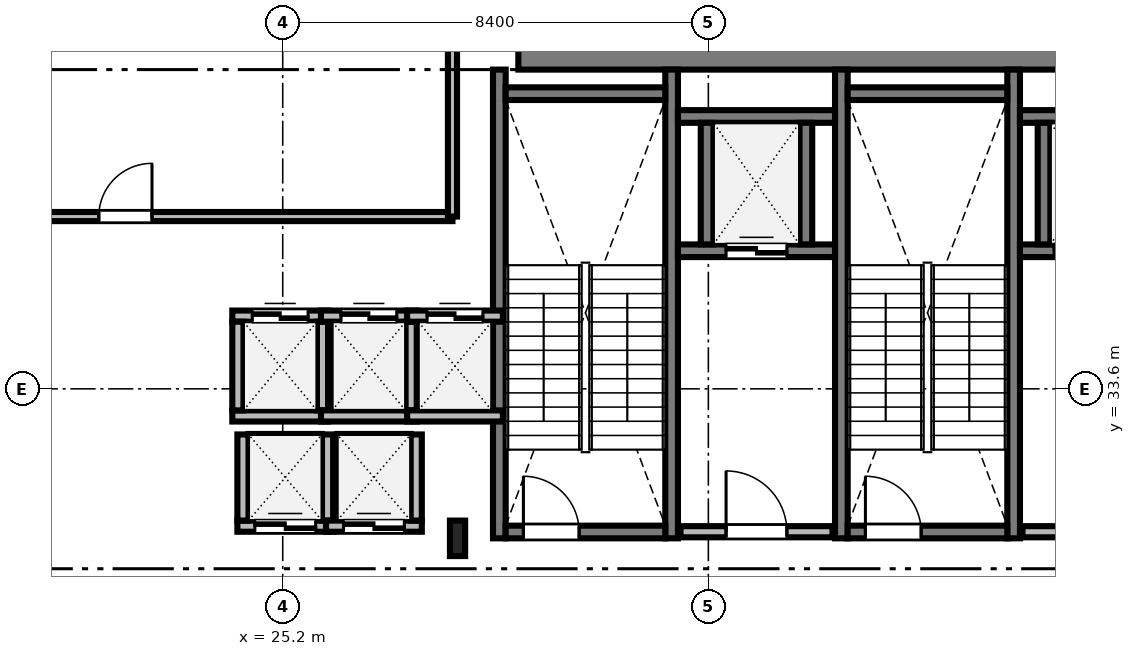
"""IFC4 building model, lengths in metres.
Left out: names, types, materials, properties, quantities, classifications, styles, units other than length and angle.
Written with IfcOpenShell. Run it as: python <this file> out.ifc"""

import sys

from ifc_helpers import new_model, si_unit, direction, frame, frame_2d, origin, origin_2d, place, context, subcontext, project, spatial, rectangle, i_section, extrude, source, transform, mapped, element, fill, save


model = new_model("IFC4")
c1 = context("Model", 3, precision=1e-05, world=origin(), true_north=direction((0.0, 1.0)))
c2 = subcontext(c1, "Body", "Model", "MODEL_VIEW")
j1 = project(units=[si_unit("LENGTHUNIT", "METRE"), si_unit("PLANEANGLEUNIT", "RADIAN")], contexts=[c1])
p1 = place(None, origin())
s1 = spatial("IfcSite", under=j1, at=p1, CompositionType="ELEMENT")
p2 = place(p1, origin())
s2 = spatial("IfcBuilding", under=s1, at=p2, CompositionType="ELEMENT")
p3 = place(p2, frame((0.0, 0.0, 172.2)))
s3 = spatial("IfcBuildingStorey", under=s2, at=p3, CompositionType="ELEMENT", Elevation=172.2)
m1 = source(origin(), c2, "Body", "SweptSolid", [
    extrude(rectangle(XDim=17.52, YDim=0.8, at=frame_2d((8.76, 0.0))), origin(), (0.0, 0.0, 1.0), 4.78),
])
p4 = place(p3, frame((29.85, 40.3, 0.0), z_axis=(0.0, 0.0, 1.0), x_axis=(1.0, 0.0, 0.0)))
e1 = element("IfcWall", 1, at=p4, inside=s3, PredefinedType="SHEAR", context=c2, shape_type="MappedRepresentation", body=[
    mapped(m1, transform((0.0, 0.0, 0.0), scale=1.0)),
])
m2 = source(origin(), c2, "Body", "SweptSolid", [
    extrude(i_section(OverallWidth=0.3, OverallDepth=0.7, WebThickness=0.017, FlangeThickness=0.032, FilletRadius=0.027, at=origin_2d()), origin(), (0.0, 0.0, 1.0), 4.78),
])
p5 = place(p3, frame((28.65, 30.65, 0.0), z_axis=(0.0, 0.0, 1.0), x_axis=(1.0, 0.0, 0.0)))
e2 = element("IfcColumn", 2, at=p5, inside=s3, PredefinedType="COLUMN", context=c2, shape_type="MappedRepresentation", body=[
    mapped(m2, transform((0.0, 0.0, 0.0), scale=1.0)),
])
m3 = source(origin(), c2, "Body", "SweptSolid", [
    extrude(rectangle(XDim=9.25, YDim=0.25, at=frame_2d((4.625, 0.0))), origin(), (0.0, 0.0, 1.0), 4.8),
])
for number, where, z_axis, x_axis in (
    (3, (29.475, 30.65, 0.0), (0.0, 0.0, 1.0), (0.0, 1.0, 0.0)),
    (4, (32.875, 30.65, 0.0), (0.0, 0.0, 1.0), (0.0, 1.0, 0.0)),
):
    element("IfcWall", number, at=place(p3, frame(where, z_axis=z_axis, x_axis=x_axis)), inside=s3, PredefinedType="SOLIDWALL", context=c2, shape_type="MappedRepresentation", body=[
        mapped(m3, transform((0.0, 0.0, 0.0), scale=1.0)),
    ])
m4 = source(origin(), c2, "Body", "SweptSolid", [
    extrude(rectangle(XDim=3.15, YDim=0.25, at=frame_2d((1.575, 0.0))), origin(), (0.0, 0.0, 1.0), 4.8),
])
p6 = place(p3, frame((29.6, 39.425, 0.0), z_axis=(0.0, 0.0, 1.0), x_axis=(1.0, 0.0, 0.0)))
e5 = element("IfcWall", 5, at=p6, inside=s3, PredefinedType="SOLIDWALL", context=c2, shape_type="MappedRepresentation", body=[
    mapped(m4, transform((0.0, 0.0, 0.0), scale=1.0)),
])
p7 = place(p3, frame((29.6, 30.775, 0.0), z_axis=(0.0, 0.0, 1.0), x_axis=(1.0, 0.0, 0.0)))
e6 = element("IfcWall", 6, at=p7, inside=s3, PredefinedType="SOLIDWALL", context=c2, shape_type="MappedRepresentation", body=[
    mapped(m4, transform((0.0, 0.0, 0.0), scale=1.0)),
])
m5 = source(origin(), c2, "Body", "SweptSolid", [
    extrude(rectangle(XDim=1.1, YDim=2.2, at=frame_2d((0.55, 1.1))), frame((0.0, 0.135, 0.0), z_axis=(0.0, -1.0, 0.0), x_axis=(1.0, 0.0, 0.0)), (0.0, 0.0, 1.0), 0.27),
])
p8 = place(p7, frame((0.35, 0.0, 0.0)))
e7 = element("IfcOpeningElement", 7, at=p8, cuts=e6, PredefinedType="OPENING", context=c2, shape_type="MappedRepresentation", body=[
    mapped(m5, transform((0.0, 0.0, 0.0), scale=1.0)),
])
for number, where, z_axis, x_axis in (
    (8, (36.225, 30.65, 0.0), (0.0, 0.0, 1.0), (0.0, 1.0, 0.0)),
    (9, (39.625, 30.65, 0.0), (0.0, 0.0, 1.0), (0.0, 1.0, 0.0)),
):
    element("IfcWall", number, at=place(p3, frame(where, z_axis=z_axis, x_axis=x_axis)), inside=s3, PredefinedType="SOLIDWALL", context=c2, shape_type="MappedRepresentation", body=[
        mapped(m3, transform((0.0, 0.0, 0.0), scale=1.0)),
    ])
p9 = place(p3, frame((36.35, 39.425, 0.0), z_axis=(0.0, 0.0, 1.0), x_axis=(1.0, 0.0, 0.0)))
e10 = element("IfcWall", 10, at=p9, inside=s3, PredefinedType="SOLIDWALL", context=c2, shape_type="MappedRepresentation", body=[
    mapped(m4, transform((0.0, 0.0, 0.0), scale=1.0)),
])
p10 = place(p3, frame((36.35, 30.775, 0.0), z_axis=(0.0, 0.0, 1.0), x_axis=(1.0, 0.0, 0.0)))
e11 = element("IfcWall", 11, at=p10, inside=s3, PredefinedType="SOLIDWALL", context=c2, shape_type="MappedRepresentation", body=[
    mapped(m4, transform((0.0, 0.0, 0.0), scale=1.0)),
])
p11 = place(p10, frame((0.35, 0.0, 0.0)))
e12 = element("IfcOpeningElement", 12, at=p11, cuts=e11, PredefinedType="OPENING", context=c2, shape_type="MappedRepresentation", body=[
    mapped(m5, transform((0.0, 0.0, 0.0), scale=1.0)),
])
m6 = source(origin(), c2, "Body", "SweptSolid", [
    extrude(rectangle(XDim=3.0, YDim=0.22, at=frame_2d((1.5, 0.0))), origin(), (0.0, 0.0, 1.0), 4.78),
])
p12 = place(p3, frame((33.05, 30.78, 0.0), z_axis=(0.0, 0.0, 1.0), x_axis=(1.0, 0.0, 0.0)))
e13 = element("IfcWall", 13, at=p12, inside=s3, PredefinedType="SOLIDWALL", context=c2, shape_type="MappedRepresentation", body=[
    mapped(m6, transform((0.0, 0.0, 0.0), scale=1.0)),
])
m7 = source(origin(), c2, "Body", "SweptSolid", [
    extrude(rectangle(XDim=1.2, YDim=2.2, at=frame_2d((0.6, 1.1))), frame((0.0, 0.12, 0.0), z_axis=(0.0, -1.0, 0.0), x_axis=(1.0, 0.0, 0.0)), (0.0, 0.0, 1.0), 0.24),
])
p13 = place(p12, frame((0.9, 0.0, 0.0)))
e14 = element("IfcOpeningElement", 14, at=p13, cuts=e13, PredefinedType="OPENING", context=c2, shape_type="MappedRepresentation", body=[
    mapped(m7, transform((0.0, 0.0, 0.0), scale=1.0)),
])
m8 = source(origin(), c2, "Body", "SweptSolid", [
    extrude(rectangle(XDim=2.8, YDim=0.22, at=frame_2d((1.4, 0.0))), origin(), (0.0, 0.0, 1.0), 4.78),
])
p14 = place(p3, frame((39.8, 30.78, 0.0), z_axis=(0.0, 0.0, 1.0), x_axis=(1.0, 0.0, 0.0)))
e15 = element("IfcWall", 15, at=p14, inside=s3, PredefinedType="SOLIDWALL", context=c2, shape_type="MappedRepresentation", body=[
    mapped(m8, transform((0.0, 0.0, 0.0), scale=1.0)),
])
p15 = place(p14, frame((0.8, 0.0, 0.0)))
e16 = element("IfcOpeningElement", 16, at=p15, cuts=e15, PredefinedType="OPENING", context=c2, shape_type="MappedRepresentation", body=[
    mapped(m7, transform((0.0, 0.0, 0.0), scale=1.0)),
])
m9 = source(origin(), c2, "Body", "SweptSolid", [
    extrude(rectangle(XDim=1.89, YDim=0.22, at=frame_2d((0.945, 0.0))), origin(), (0.0, 0.0, 1.0), 4.78),
])
p16 = place(p3, frame((24.205, 33.065, 0.0), z_axis=(0.0, 0.0, 1.0), x_axis=(1.0, 0.0, 0.0)))
e17 = element("IfcWall", 17, at=p16, inside=s3, PredefinedType="SOLIDWALL", context=c2, shape_type="MappedRepresentation", body=[
    mapped(m9, transform((0.0, 0.0, 0.0), scale=1.0)),
])
p17 = place(p3, frame((24.205, 35.035, 0.0), z_axis=(0.0, 0.0, 1.0), x_axis=(1.0, 0.0, 0.0)))
e18 = element("IfcWall", 18, at=p17, inside=s3, PredefinedType="SOLIDWALL", context=c2, shape_type="MappedRepresentation", body=[
    mapped(m9, transform((0.0, 0.0, 0.0), scale=1.0)),
])
m10 = source(origin(), c2, "Body", "SweptSolid", [
    extrude(rectangle(XDim=1.1, YDim=2.2, at=frame_2d((0.55, 1.1))), frame((0.0, 0.12, 0.0), z_axis=(0.0, -1.0, 0.0), x_axis=(1.0, 0.0, 0.0)), (0.0, 0.0, 1.0), 0.24),
])
p18 = place(p17, frame((0.395, 0.0, 0.0)))
e19 = element("IfcOpeningElement", 19, at=p18, cuts=e18, PredefinedType="OPENING", context=c2, shape_type="MappedRepresentation", body=[
    mapped(m10, transform((0.0, 0.0, 0.0), scale=1.0)),
])
m11 = source(origin(), c2, "Body", "SweptSolid", [
    extrude(rectangle(XDim=1.75, YDim=0.22, at=frame_2d((0.875, 0.0))), origin(), (0.0, 0.0, 1.0), 4.78),
])
for number, where, z_axis, x_axis in (
    (20, (24.315, 33.175, 0.0), (0.0, 0.0, 1.0), (0.0, 1.0, 0.0)),
    (21, (25.985, 33.175, 0.0), (0.0, 0.0, 1.0), (0.0, 1.0, 0.0)),
):
    element("IfcWall", number, at=place(p3, frame(where, z_axis=z_axis, x_axis=x_axis)), inside=s3, PredefinedType="SOLIDWALL", context=c2, shape_type="MappedRepresentation", body=[
        mapped(m11, transform((0.0, 0.0, 0.0), scale=1.0)),
    ])
p19 = place(p3, frame((25.955, 33.065, 0.0), z_axis=(0.0, 0.0, 1.0), x_axis=(1.0, 0.0, 0.0)))
e22 = element("IfcWall", 22, at=p19, inside=s3, PredefinedType="SOLIDWALL", context=c2, shape_type="MappedRepresentation", body=[
    mapped(m9, transform((0.0, 0.0, 0.0), scale=1.0)),
])
p20 = place(p3, frame((25.955, 35.035, 0.0), z_axis=(0.0, 0.0, 1.0), x_axis=(1.0, 0.0, 0.0)))
e23 = element("IfcWall", 23, at=p20, inside=s3, PredefinedType="SOLIDWALL", context=c2, shape_type="MappedRepresentation", body=[
    mapped(m9, transform((0.0, 0.0, 0.0), scale=1.0)),
])
p21 = place(p20, frame((0.395, 0.0, 0.0)))
e24 = element("IfcOpeningElement", 24, at=p21, cuts=e23, PredefinedType="OPENING", context=c2, shape_type="MappedRepresentation", body=[
    mapped(m10, transform((0.0, 0.0, 0.0), scale=1.0)),
])
p22 = place(p3, frame((27.735, 33.175, 0.0), z_axis=(0.0, 0.0, 1.0), x_axis=(0.0, 1.0, 0.0)))
e25 = element("IfcWall", 25, at=p22, inside=s3, PredefinedType="SOLIDWALL", context=c2, shape_type="MappedRepresentation", body=[
    mapped(m11, transform((0.0, 0.0, 0.0), scale=1.0)),
])
p23 = place(p3, frame((27.655, 33.065, 0.0), z_axis=(0.0, 0.0, 1.0), x_axis=(1.0, 0.0, 0.0)))
e26 = element("IfcWall", 26, at=p23, inside=s3, PredefinedType="SOLIDWALL", context=c2, shape_type="MappedRepresentation", body=[
    mapped(m9, transform((0.0, 0.0, 0.0), scale=1.0)),
])
p24 = place(p3, frame((27.655, 35.035, 0.0), z_axis=(0.0, 0.0, 1.0), x_axis=(1.0, 0.0, 0.0)))
e27 = element("IfcWall", 27, at=p24, inside=s3, PredefinedType="SOLIDWALL", context=c2, shape_type="MappedRepresentation", body=[
    mapped(m9, transform((0.0, 0.0, 0.0), scale=1.0)),
])
p25 = place(p24, frame((0.395, 0.0, 0.0)))
e28 = element("IfcOpeningElement", 28, at=p25, cuts=e27, PredefinedType="OPENING", context=c2, shape_type="MappedRepresentation", body=[
    mapped(m10, transform((0.0, 0.0, 0.0), scale=1.0)),
])
m12 = source(origin(), c2, "Body", "SweptSolid", [
    extrude(rectangle(XDim=3.1, YDim=0.25, at=frame_2d((1.55, 0.0))), origin(), (0.0, 0.0, 1.0), 4.78),
])
p26 = place(p3, frame((33.0, 36.325, 0.0), z_axis=(0.0, 0.0, 1.0), x_axis=(1.0, 0.0, 0.0)))
e29 = element("IfcWall", 29, at=p26, inside=s3, PredefinedType="SOLIDWALL", context=c2, shape_type="MappedRepresentation", body=[
    mapped(m12, transform((0.0, 0.0, 0.0), scale=1.0)),
])
m13 = source(origin(), c2, "Body", "SweptSolid", [
    extrude(rectangle(XDim=1.2, YDim=2.25, at=frame_2d((0.6, 1.125))), frame((0.0, 0.135, 0.0), z_axis=(0.0, -1.0, 0.0), x_axis=(1.0, 0.0, 0.0)), (0.0, 0.0, 1.0), 0.27),
])
p27 = place(p26, frame((0.95, 0.0, 0.0)))
e30 = element("IfcOpeningElement", 30, at=p27, cuts=e29, PredefinedType="OPENING", context=c2, shape_type="MappedRepresentation", body=[
    mapped(m13, transform((0.0, 0.0, 0.0), scale=1.0)),
])
p28 = place(p3, frame((33.0, 38.975, 0.0), z_axis=(0.0, 0.0, 1.0), x_axis=(1.0, 0.0, 0.0)))
e31 = element("IfcWall", 31, at=p28, inside=s3, PredefinedType="SOLIDWALL", context=c2, shape_type="MappedRepresentation", body=[
    mapped(m12, transform((0.0, 0.0, 0.0), scale=1.0)),
])
m14 = source(origin(), c2, "Body", "SweptSolid", [
    extrude(rectangle(XDim=2.4, YDim=0.25, at=frame_2d((1.2, 0.0))), origin(), (0.0, 0.0, 1.0), 4.78),
])
for number, where, z_axis, x_axis in (
    (32, (33.575, 36.45, 0.0), (0.0, 0.0, 1.0), (0.0, 1.0, 0.0)),
    (33, (35.525, 36.45, 0.0), (0.0, 0.0, 1.0), (0.0, 1.0, 0.0)),
):
    element("IfcWall", number, at=place(p3, frame(where, z_axis=z_axis, x_axis=x_axis)), inside=s3, PredefinedType="SOLIDWALL", context=c2, shape_type="MappedRepresentation", body=[
        mapped(m14, transform((0.0, 0.0, 0.0), scale=1.0)),
    ])
m15 = source(origin(), c2, "Body", "SweptSolid", [
    extrude(rectangle(XDim=2.55, YDim=0.25, at=frame_2d((1.275, 0.0))), origin(), (0.0, 0.0, 1.0), 4.78),
])
p29 = place(p3, frame((39.75, 36.325, 0.0), z_axis=(0.0, 0.0, 1.0), x_axis=(1.0, 0.0, 0.0)))
e34 = element("IfcWall", 34, at=p29, inside=s3, PredefinedType="SOLIDWALL", context=c2, shape_type="MappedRepresentation", body=[
    mapped(m15, transform((0.0, 0.0, 0.0), scale=1.0)),
])
p30 = place(p29, frame((0.675, 0.0, 0.0)))
e35 = element("IfcOpeningElement", 35, at=p30, cuts=e34, PredefinedType="OPENING", context=c2, shape_type="MappedRepresentation", body=[
    mapped(m13, transform((0.0, 0.0, 0.0), scale=1.0)),
])
p31 = place(p3, frame((39.75, 38.975, 0.0), z_axis=(0.0, 0.0, 1.0), x_axis=(1.0, 0.0, 0.0)))
e36 = element("IfcWall", 36, at=p31, inside=s3, PredefinedType="SOLIDWALL", context=c2, shape_type="MappedRepresentation", body=[
    mapped(m15, transform((0.0, 0.0, 0.0), scale=1.0)),
])
p32 = place(p3, frame((40.225, 36.45, 0.0), z_axis=(0.0, 0.0, 1.0), x_axis=(0.0, 1.0, 0.0)))
e37 = element("IfcWall", 37, at=p32, inside=s3, PredefinedType="SOLIDWALL", context=c2, shape_type="MappedRepresentation", body=[
    mapped(m14, transform((0.0, 0.0, 0.0), scale=1.0)),
])
m16 = source(origin(), c2, "Body", "SweptSolid", [
    extrude(rectangle(XDim=1.89, YDim=0.22, at=frame_2d((0.945, 0.0))), origin(), (0.0, 0.0, 1.0), 4.78),
])
p33 = place(p3, frame((24.305, 30.89, 0.0), z_axis=(0.0, 0.0, 1.0), x_axis=(1.0, 0.0, 0.0)))
e38 = element("IfcWall", 38, at=p33, inside=s3, PredefinedType="SOLIDWALL", context=c2, shape_type="MappedRepresentation", body=[
    mapped(m16, transform((0.0, 0.0, 0.0), scale=1.0)),
])
m17 = source(origin(), c2, "Body", "SweptSolid", [
    extrude(rectangle(XDim=1.2, YDim=2.25, at=frame_2d((0.6, 1.125))), frame((0.0, 0.12, 0.0), z_axis=(0.0, -1.0, 0.0), x_axis=(1.0, 0.0, 0.0)), (0.0, 0.0, 1.0), 0.24),
])
p34 = place(p33, frame((0.345, 0.0, 0.0)))
e39 = element("IfcOpeningElement", 39, at=p34, cuts=e38, PredefinedType="OPENING", context=c2, shape_type="MappedRepresentation", body=[
    mapped(m17, transform((0.0, 0.0, 0.0), scale=1.0)),
])
m18 = source(origin(), c2, "Body", "SweptSolid", [
    extrude(rectangle(XDim=1.7, YDim=0.22, at=frame_2d((0.85, 0.0))), origin(), (0.0, 0.0, 1.0), 4.78),
])
for number, where, z_axis, x_axis in (
    (40, (24.415, 31.0, 0.0), (0.0, 0.0, 1.0), (0.0, 1.0, 0.0)),
    (41, (26.085, 31.0, 0.0), (0.0, 0.0, 1.0), (0.0, 1.0, 0.0)),
):
    element("IfcWall", number, at=place(p3, frame(where, z_axis=z_axis, x_axis=x_axis)), inside=s3, PredefinedType="SOLIDWALL", context=c2, shape_type="MappedRepresentation", body=[
        mapped(m18, transform((0.0, 0.0, 0.0), scale=1.0)),
    ])
p35 = place(p3, frame((26.055, 30.89, 0.0), z_axis=(0.0, 0.0, 1.0), x_axis=(1.0, 0.0, 0.0)))
e42 = element("IfcWall", 42, at=p35, inside=s3, PredefinedType="SOLIDWALL", context=c2, shape_type="MappedRepresentation", body=[
    mapped(m16, transform((0.0, 0.0, 0.0), scale=1.0)),
])
p36 = place(p35, frame((0.345, 0.0, 0.0)))
e43 = element("IfcOpeningElement", 43, at=p36, cuts=e42, PredefinedType="OPENING", context=c2, shape_type="MappedRepresentation", body=[
    mapped(m17, transform((0.0, 0.0, 0.0), scale=1.0)),
])
p37 = place(p3, frame((27.835, 31.0, 0.0), z_axis=(0.0, 0.0, 1.0), x_axis=(0.0, 1.0, 0.0)))
e44 = element("IfcWall", 44, at=p37, inside=s3, PredefinedType="SOLIDWALL", context=c2, shape_type="MappedRepresentation", body=[
    mapped(m18, transform((0.0, 0.0, 0.0), scale=1.0)),
])
m19 = source(origin(), c2, "Body", "SweptSolid", [
    extrude(rectangle(XDim=17.128, YDim=0.18, at=frame_2d((8.564, 0.0))), origin(), (0.0, 0.0, 1.0), 4.022),
])
p38 = place(p3, frame((11.422, 37.0, 0.0), z_axis=(0.0, 0.0, 1.0), x_axis=(1.0, 0.0, 0.0)))
e45 = element("IfcWall", 45, at=p38, inside=s3, PredefinedType="PARTITIONING", context=c2, shape_type="MappedRepresentation", body=[
    mapped(m19, transform((0.0, 0.0, 0.0), scale=1.0)),
])
m20 = source(origin(), c2, "Body", "SweptSolid", [
    extrude(rectangle(XDim=1.05, YDim=2.2, at=frame_2d((0.525, 1.1))), frame((0.0, 0.1, 0.0), z_axis=(0.0, -1.0, 0.0), x_axis=(1.0, 0.0, 0.0)), (0.0, 0.0, 1.0), 0.2),
])
p39 = place(p38, frame((10.148, 0.0, 0.0)))
e46 = element("IfcOpeningElement", 46, at=p39, cuts=e45, PredefinedType="OPENING", context=c2, shape_type="MappedRepresentation", body=[
    mapped(m20, transform((0.0, 0.0, 0.0), scale=1.0)),
])
m21 = source(origin(), c2, "Body", "SweptSolid", [
    extrude(rectangle(XDim=11.278, YDim=0.18, at=frame_2d((5.639, 0.0))), origin(), (0.0, 0.0, 1.0), 4.022),
])
p40 = place(p3, frame((28.55, 37.0, 0.0), z_axis=(0.0, 0.0, 1.0), x_axis=(0.0, 1.0, 0.0)))
e47 = element("IfcWall", 47, at=p40, inside=s3, PredefinedType="PARTITIONING", context=c2, shape_type="MappedRepresentation", body=[
    mapped(m21, transform((0.0, 0.0, 0.0), scale=1.0)),
])
m22 = source(origin(), c2, "Body", "SweptSolid", [
    extrude(rectangle(XDim=1.1, YDim=2.2, at=frame_2d((0.55, 1.1))), frame((0.0, 0.025, 0.0), z_axis=(0.0, -1.0, 0.0), x_axis=(1.0, 0.0, 0.0)), (0.0, 0.0, 1.0), 0.05),
])
p41 = place(p8, origin())
e48 = element("IfcDoor", 48, at=p41, inside=s3, OperationType="SINGLE_SWING_LEFT", PredefinedType="DOOR", context=c2, shape_type="MappedRepresentation", body=[
    mapped(m22, transform((0.0, 0.0, 0.0), scale=1.0)),
])
fill(e7, e48)
p42 = place(p11, origin())
e49 = element("IfcDoor", 49, at=p42, inside=s3, OperationType="SINGLE_SWING_LEFT", PredefinedType="DOOR", context=c2, shape_type="MappedRepresentation", body=[
    mapped(m22, transform((0.0, 0.0, 0.0), scale=1.0)),
])
fill(e12, e49)
m23 = source(origin(), c2, "Body", "SweptSolid", [
    extrude(rectangle(XDim=1.2, YDim=2.2, at=frame_2d((0.6, 1.1))), frame((0.0, 0.025, 0.0), z_axis=(0.0, -1.0, 0.0), x_axis=(1.0, 0.0, 0.0)), (0.0, 0.0, 1.0), 0.05),
])
p43 = place(p13, origin())
e50 = element("IfcDoor", 50, at=p43, inside=s3, OperationType="SINGLE_SWING_LEFT", PredefinedType="DOOR", context=c2, shape_type="MappedRepresentation", body=[
    mapped(m23, transform((0.0, 0.0, 0.0), scale=1.0)),
])
fill(e14, e50)
p44 = place(p18, origin())
e51 = element("IfcDoor", 51, at=p44, inside=s3, OperationType="DOUBLE_DOOR_SLIDING", PredefinedType="DOOR", context=c2, shape_type="MappedRepresentation", body=[
    mapped(m22, transform((0.0, 0.0, 0.0), scale=1.0)),
])
fill(e19, e51)
p45 = place(p21, origin())
e52 = element("IfcDoor", 52, at=p45, inside=s3, OperationType="DOUBLE_DOOR_SLIDING", PredefinedType="DOOR", context=c2, shape_type="MappedRepresentation", body=[
    mapped(m22, transform((0.0, 0.0, 0.0), scale=1.0)),
])
fill(e24, e52)
p46 = place(p25, origin())
e53 = element("IfcDoor", 53, at=p46, inside=s3, OperationType="DOUBLE_DOOR_SLIDING", PredefinedType="DOOR", context=c2, shape_type="MappedRepresentation", body=[
    mapped(m22, transform((0.0, 0.0, 0.0), scale=1.0)),
])
fill(e28, e53)
m24 = source(origin(), c2, "Body", "SweptSolid", [
    extrude(rectangle(XDim=1.2, YDim=2.25, at=frame_2d((0.6, 1.125))), frame((0.0, 0.025, 0.0), z_axis=(0.0, -1.0, 0.0), x_axis=(1.0, 0.0, 0.0)), (0.0, 0.0, 1.0), 0.05),
])
p47 = place(p27, origin())
e54 = element("IfcDoor", 54, at=p47, inside=s3, OperationType="DOUBLE_DOOR_SLIDING", PredefinedType="DOOR", context=c2, shape_type="MappedRepresentation", body=[
    mapped(m24, transform((0.0, 0.0, 0.0), scale=1.0)),
])
fill(e30, e54)
p48 = place(p30, origin())
e55 = element("IfcDoor", 55, at=p48, inside=s3, OperationType="DOUBLE_DOOR_SLIDING", PredefinedType="DOOR", context=c2, shape_type="MappedRepresentation", body=[
    mapped(m24, transform((0.0, 0.0, 0.0), scale=1.0)),
])
fill(e35, e55)
p49 = place(p34, origin())
e56 = element("IfcDoor", 56, at=p49, inside=s3, OperationType="DOUBLE_DOOR_SLIDING", PredefinedType="DOOR", context=c2, shape_type="MappedRepresentation", body=[
    mapped(m24, transform((0.0, 0.0, 0.0), scale=1.0)),
])
fill(e39, e56)
p50 = place(p36, origin())
e57 = element("IfcDoor", 57, at=p50, inside=s3, OperationType="DOUBLE_DOOR_SLIDING", PredefinedType="DOOR", context=c2, shape_type="MappedRepresentation", body=[
    mapped(m24, transform((0.0, 0.0, 0.0), scale=1.0)),
])
fill(e43, e57)
m25 = source(origin(), c2, "Body", "SweptSolid", [
    extrude(rectangle(XDim=1.05, YDim=2.2, at=frame_2d((0.525, 1.1))), frame((0.0, 0.025, 0.0), z_axis=(0.0, -1.0, 0.0), x_axis=(1.0, 0.0, 0.0)), (0.0, 0.0, 1.0), 0.05),
])
p51 = place(p39, origin())
e58 = element("IfcDoor", 58, at=p51, inside=s3, OperationType="SINGLE_SWING_RIGHT", PredefinedType="DOOR", context=c2, shape_type="MappedRepresentation", body=[
    mapped(m25, transform((0.0, 0.0, 0.0), scale=1.0)),
])
fill(e46, e58)
save(model, sys.argv[1])
